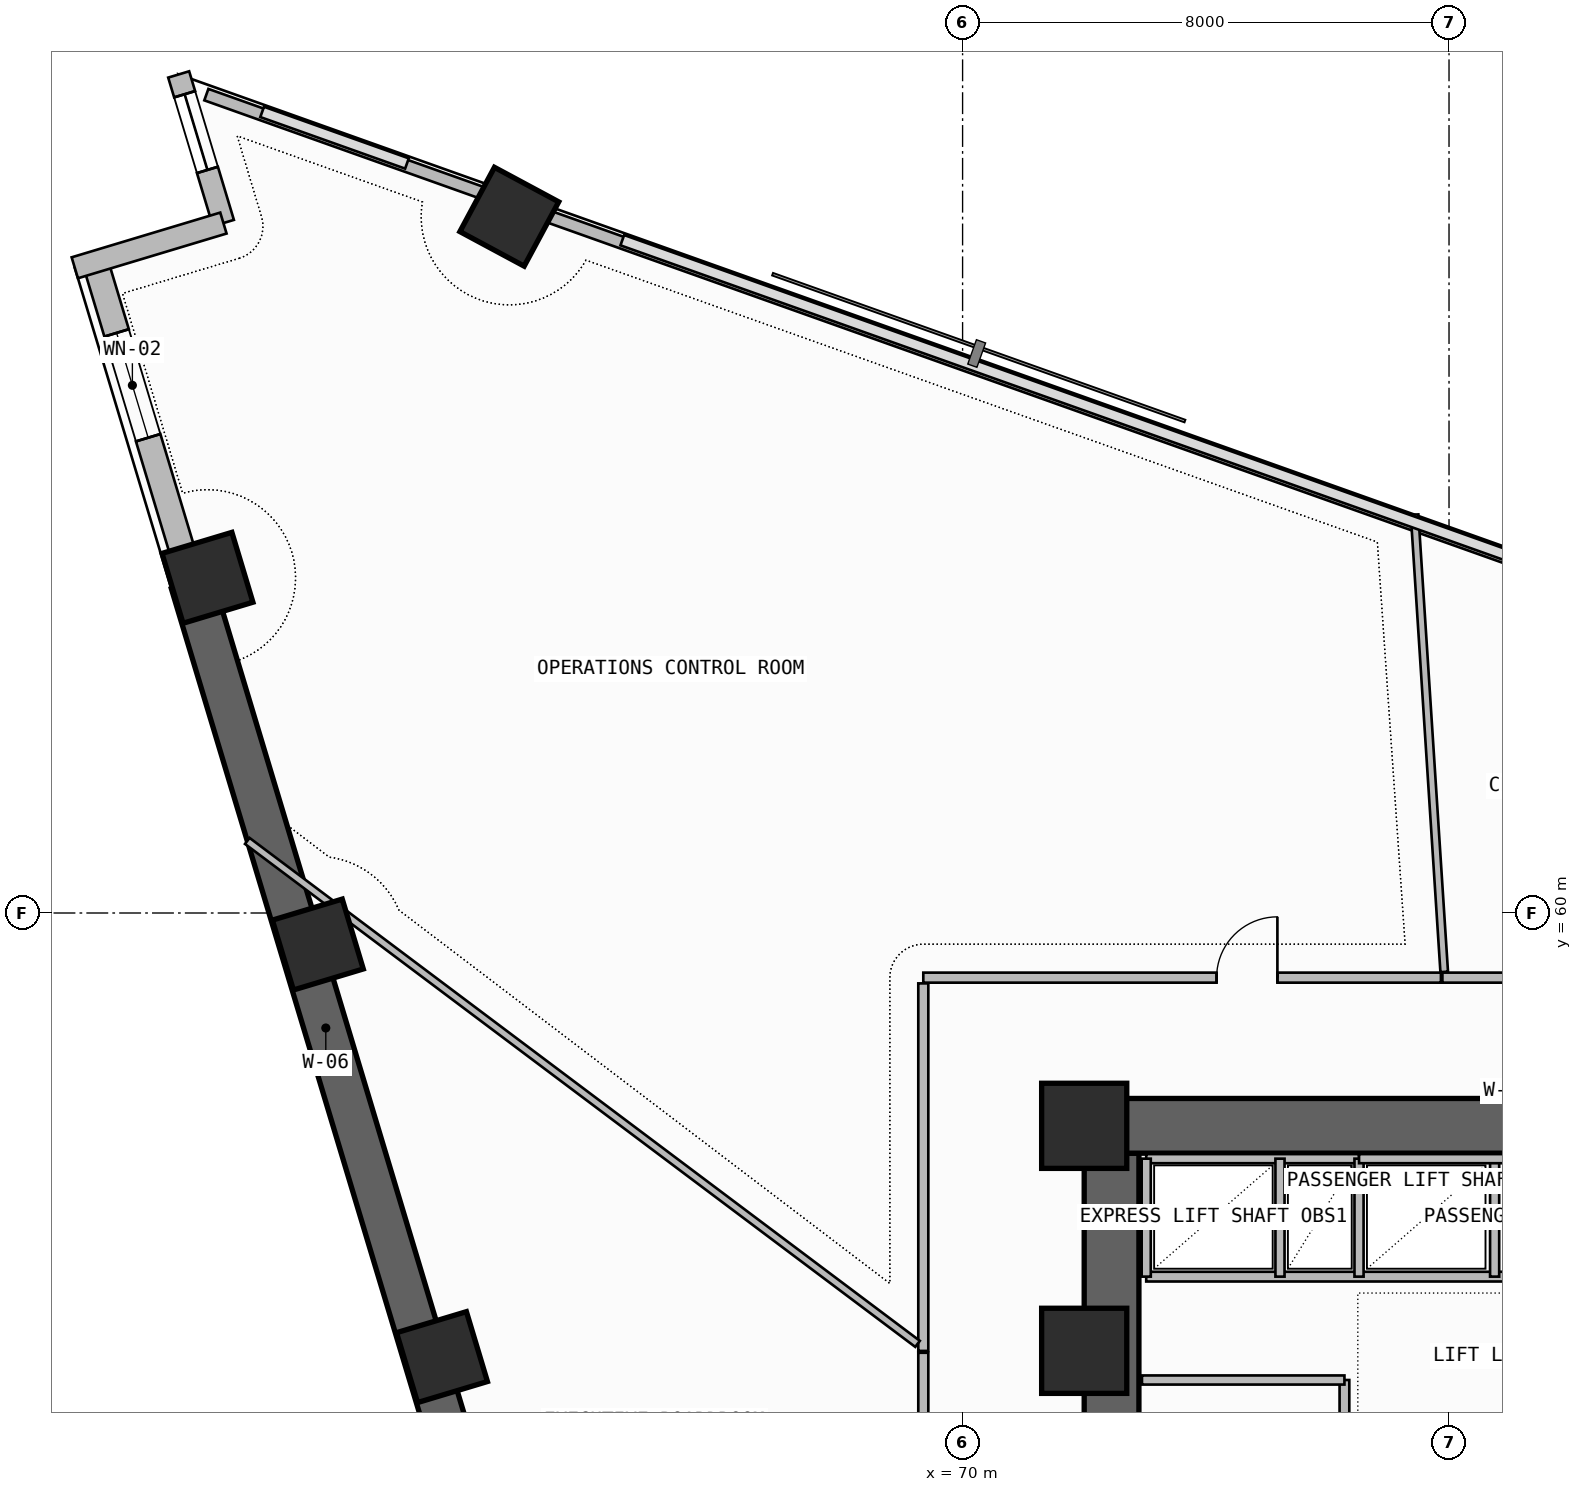
"""IFC4 building model, lengths in metres.
Left out: names, types, materials, properties, quantities, classifications, styles, units other than length and angle.
Written with IfcOpenShell. Run it as: python <this file> out.ifc"""

import sys

from ifc_helpers import new_model, si_unit, direction, frame, frame_2d, origin, origin_2d, place, context, subcontext, project, spatial, rectangle, extrude, element, fill, save


model = new_model("IFC4")
c1 = context("Model", 3, precision=1e-05, world=origin(), true_north=direction((0.0, 1.0)))
c2 = subcontext(c1, "Body", "Model", "MODEL_VIEW")
j1 = project(units=[si_unit("LENGTHUNIT", "METRE"), si_unit("PLANEANGLEUNIT", "RADIAN")], contexts=[c1])
p1 = place(None, origin())
s1 = spatial("IfcSite", under=j1, at=p1, CompositionType="ELEMENT")
p2 = place(p1, origin())
s2 = spatial("IfcBuilding", under=s1, at=p2, CompositionType="ELEMENT")
p3 = place(p2, frame((0.0, 0.0, 132.3)))
s3 = spatial("IfcBuildingStorey", under=s2, at=p3, CompositionType="ELEMENT", Elevation=132.3)
p4 = place(p3, frame((72.45, 43.35, -0.4), z_axis=(0.0, 0.0, 1.0), x_axis=(0.0, 1.0, 0.0)))
e1 = element("IfcWall", 1, at=p4, inside=s3, PredefinedType="SHEAR", context=c2, shape_type="SweptSolid", body=[
    extrude(rectangle(XDim=12.7, YDim=0.9, at=frame_2d((6.35, 0.0))), origin(), (0.0, 0.0, 1.0), 3.74),
])
p5 = place(p4, frame((1.35, 0.0, 0.4)))
e2 = element("IfcOpeningElement", 2, at=p5, cuts=e1, PredefinedType="OPENING", context=c2, shape_type="SweptSolid", body=[
    extrude(rectangle(XDim=1.2, YDim=2.2, at=frame_2d((0.6, 1.1))), frame((0.0, 0.46, 0.0), z_axis=(0.0, -1.0, 0.0), x_axis=(1.0, 0.0, 0.0)), (0.0, 0.0, 1.0), 0.92),
])
p6 = place(p3, frame((72.0, 56.5, -0.4), z_axis=(0.0, 0.0, 1.0), x_axis=(1.0, 0.0, 0.0)))
e3 = element("IfcWall", 3, at=p6, inside=s3, PredefinedType="SHEAR", context=c2, shape_type="SweptSolid", body=[
    extrude(rectangle(XDim=13.9, YDim=0.9, at=frame_2d((6.95, 0.0))), origin(), (0.0, 0.0, 1.0), 3.74),
])
for number, where, z_axis, x_axis in (
    (4, (72.0, 52.8, 0.0), (0.0, 0.0, 1.0), (1.0, 0.0, 0.0)),
    (5, (72.0, 56.5, 0.0), (0.0, 0.0, 1.0), (1.0, 0.0, 0.0)),
):
    element("IfcColumn", number, at=place(p3, frame(where, z_axis=z_axis, x_axis=x_axis)), inside=s3, PredefinedType="COLUMN", context=c2, shape_type="SweptSolid", body=[
        extrude(rectangle(XDim=1.4, YDim=1.4, at=origin_2d()), origin(), (0.0, 0.0, 1.0), 3.6),
    ])
for number, where, z_axis, x_axis in (
    (6, (62.545, 71.45, -0.4), (0.0, 0.0, 1.0), (0.473, 0.881, 0.0)),
    (7, (57.581, 65.512, -0.4), (0.0, 0.0, 1.0), (-0.288, 0.958, 0.0)),
    (8, (59.396, 59.481, -0.4), (0.0, 0.0, 1.0), (-0.288, 0.958, 0.0)),
    (9, (61.438, 52.696, -0.4), (0.0, 0.0, 1.0), (-0.288, 0.958, 0.0)),
):
    element("IfcColumn", number, at=place(p3, frame(where, z_axis=z_axis, x_axis=x_axis)), inside=s3, PredefinedType="COLUMN", context=c2, shape_type="SweptSolid", body=[
        extrude(rectangle(XDim=1.2, YDim=1.2, at=origin_2d()), origin(), (0.0, 0.0, 1.0), 4.0),
    ])
p7 = place(p3, frame((55.734, 70.711, 0.0), z_axis=(0.0, 0.0, 1.0), x_axis=(0.288221590884, -0.957563739157, 0.0)))
e10 = element("IfcWall", 10, at=p7, inside=s3, PredefinedType="SOLIDWALL", context=c2, shape_type="SweptSolid", body=[
    extrude(rectangle(XDim=5.511, YDim=0.42, at=frame_2d((2.755, 0.0))), origin(), (0.0, 0.0, 1.0), 2.725),
])
p8 = place(p7, frame((1.223, 0.0, 1.2)))
e11 = element("IfcOpeningElement", 11, at=p8, cuts=e10, PredefinedType="OPENING", context=c2, shape_type="SweptSolid", body=[
    extrude(rectangle(XDim=1.8, YDim=0.9, at=frame_2d((0.9, 0.45))), frame((0.0, 0.22, 0.0), z_axis=(0.0, -1.0, 0.0), x_axis=(1.0, 0.0, 0.0)), (0.0, 0.0, 1.0), 0.44),
])
p9 = place(p3, frame((57.323, 65.434, -0.4), z_axis=(0.0, 0.0, 1.0), x_axis=(0.288188159352, -0.957573801234, 0.0)))
e12 = element("IfcWall", 12, at=p9, inside=s3, PredefinedType="SHEAR", context=c2, shape_type="SweptSolid", body=[
    extrude(rectangle(XDim=20.469, YDim=0.7, at=frame_2d((10.234, 0.0))), origin(), (0.0, 0.0, 1.0), 3.74),
])
p10 = place(p9, frame((15.3, 0.0, 1.2)))
e13 = element("IfcOpeningElement", 13, at=p10, cuts=e12, PredefinedType="OPENING", context=c2, shape_type="SweptSolid", body=[
    extrude(rectangle(XDim=1.8, YDim=0.9, at=frame_2d((0.9, 0.45))), frame((0.0, 0.36, 0.0), z_axis=(0.0, -1.0, 0.0), x_axis=(1.0, 0.0, 0.0)), (0.0, 0.0, 1.0), 0.72),
])
p11 = place(p3, frame((57.108, 73.79, 0.0), z_axis=(0.0, 0.0, 1.0), x_axis=(0.288198985694, -0.957570542908, 0.0)))
e14 = element("IfcWall", 14, at=p11, inside=s3, PredefinedType="SOLIDWALL", context=c2, shape_type="SweptSolid", body=[
    extrude(rectangle(XDim=2.552, YDim=0.36, at=frame_2d((1.276, 0.0))), origin(), (0.0, 0.0, 1.0), 3.34),
])
p12 = place(p11, frame((0.34, 0.0, 0.45)))
e15 = element("IfcOpeningElement", 15, at=p12, cuts=e14, PredefinedType="OPENING", context=c2, shape_type="SweptSolid", body=[
    extrude(rectangle(XDim=1.3, YDim=2.4, at=frame_2d((0.65, 1.2))), frame((0.0, 0.19, 0.0), z_axis=(0.0, -1.0, 0.0), x_axis=(1.0, 0.0, 0.0)), (0.0, 0.0, 1.0), 0.38),
])
p13 = place(p3, frame((57.843, 71.346, 0.0), z_axis=(0.0, 0.0, 1.0), x_axis=(-0.95757848653, -0.288172590882, 0.0)))
e16 = element("IfcWall", 16, at=p13, inside=s3, PredefinedType="SOLIDWALL", context=c2, shape_type="SweptSolid", body=[
    extrude(rectangle(XDim=2.553, YDim=0.36, at=frame_2d((1.276, 0.0))), origin(), (0.0, 0.0, 1.0), 3.34),
])
p14 = place(p3, frame((89.368, 62.13, 0.0), z_axis=(0.0, 0.0, 1.0), x_axis=(-0.942033439765, 0.335518998515, 0.0)))
e17 = element("IfcWall", 17, at=p14, inside=s3, PredefinedType="PARAPET", context=c2, shape_type="SweptSolid", body=[
    extrude(rectangle(XDim=27.969, YDim=0.2, at=frame_2d((13.985, 0.0))), origin(), (0.0, 0.0, 1.0), 1.15),
])
p15 = place(p3, frame((62.218, 71.801, 0.0), z_axis=(0.0, 0.0, 1.0), x_axis=(-0.942038862895, 0.335503771655, 0.0)))
e18 = element("IfcWall", 18, at=p15, inside=s3, PredefinedType="PARAPET", context=c2, shape_type="SweptSolid", body=[
    extrude(rectangle(XDim=4.942, YDim=0.2, at=frame_2d((2.471, 0.0))), origin(), (0.0, 0.0, 1.0), 1.15),
])
p16 = place(p3, frame((76.28, 47.18, 0.0), z_axis=(0.0, 0.0, 1.0), x_axis=(0.0, 1.0, 0.0)))
e19 = element("IfcWall", 19, at=p16, inside=s3, PredefinedType="SOLIDWALL", context=c2, shape_type="SweptSolid", body=[
    extrude(rectangle(XDim=5.14, YDim=0.16, at=frame_2d((2.57, 0.0))), origin(), (0.0, 0.0, 1.0), 3.34),
])
p17 = place(p16, frame((1.05, 0.0, 0.0)))
e20 = element("IfcOpeningElement", 20, at=p17, cuts=e19, PredefinedType="OPENING", context=c2, shape_type="SweptSolid", body=[
    extrude(rectangle(XDim=1.0, YDim=2.2, at=frame_2d((0.5, 1.1))), frame((0.0, 0.09, 0.0), z_axis=(0.0, -1.0, 0.0), x_axis=(1.0, 0.0, 0.0)), (0.0, 0.0, 1.0), 0.18),
])
p18 = place(p16, frame((3.45, 0.0, 0.0)))
e21 = element("IfcOpeningElement", 21, at=p18, cuts=e19, PredefinedType="OPENING", context=c2, shape_type="SweptSolid", body=[
    extrude(rectangle(XDim=0.9, YDim=2.1, at=frame_2d((0.45, 1.05))), frame((0.0, 0.09, 0.0), z_axis=(0.0, -1.0, 0.0), x_axis=(1.0, 0.0, 0.0)), (0.0, 0.0, 1.0), 0.18),
])
p19 = place(p3, frame((72.95, 52.32, 0.0), z_axis=(0.0, 0.0, 1.0), x_axis=(1.0, 0.0, 0.0)))
e22 = element("IfcWall", 22, at=p19, inside=s3, PredefinedType="SOLIDWALL", context=c2, shape_type="SweptSolid", body=[
    extrude(rectangle(XDim=3.33, YDim=0.15, at=frame_2d((1.665, 0.0))), origin(), (0.0, 0.0, 1.0), 3.34),
])
p20 = place(p3, frame((73.02, 54.02, 0.0), z_axis=(0.0, 0.0, 1.0), x_axis=(1.0, 0.0, 0.0)))
e23 = element("IfcWall", 23, at=p20, inside=s3, PredefinedType="SOLIDWALL", context=c2, shape_type="SweptSolid", body=[
    extrude(rectangle(XDim=12.08, YDim=0.16, at=frame_2d((6.04, 0.0))), origin(), (0.0, 0.0, 1.0), 3.34),
])
p21 = place(p3, frame((73.02, 55.96, 0.0), z_axis=(0.0, 0.0, 1.0), x_axis=(1.0, 0.0, 0.0)))
e24 = element("IfcWall", 24, at=p21, inside=s3, PredefinedType="SOLIDWALL", context=c2, shape_type="SweptSolid", body=[
    extrude(rectangle(XDim=3.5, YDim=0.15, at=frame_2d((1.75, 0.0))), origin(), (0.0, 0.0, 1.0), 3.34),
])
p22 = place(p3, frame((73.02, 54.02, 0.0), z_axis=(0.0, 0.0, 1.0), x_axis=(0.0, 1.0, 0.0)))
e25 = element("IfcWall", 25, at=p22, inside=s3, PredefinedType="PLUMBINGWALL", context=c2, shape_type="SweptSolid", body=[
    extrude(rectangle(XDim=1.94, YDim=0.15, at=frame_2d((0.97, 0.0))), origin(), (0.0, 0.0, 1.0), 3.34),
])
p23 = place(p3, frame((76.52, 54.02, 0.0), z_axis=(0.0, 0.0, 1.0), x_axis=(0.0, 1.0, 0.0)))
e26 = element("IfcWall", 26, at=p23, inside=s3, PredefinedType="SOLIDWALL", context=c2, shape_type="SweptSolid", body=[
    extrude(rectangle(XDim=1.94, YDim=0.15, at=frame_2d((0.97, 0.0))), origin(), (0.0, 0.0, 1.0), 3.34),
])
p24 = place(p3, frame((75.22, 54.02, 0.0), z_axis=(0.0, 0.0, 1.0), x_axis=(0.0, 1.0, 0.0)))
e27 = element("IfcWall", 27, at=p24, inside=s3, PredefinedType="PLUMBINGWALL", context=c2, shape_type="SweptSolid", body=[
    extrude(rectangle(XDim=1.94, YDim=0.15, at=frame_2d((0.97, 0.0))), origin(), (0.0, 0.0, 1.0), 3.34),
])
p25 = place(p3, frame((78.75, 54.02, 0.0), z_axis=(0.0, 0.0, 1.0), x_axis=(0.0, 1.0, 0.0)))
e28 = element("IfcWall", 28, at=p25, inside=s3, PredefinedType="PLUMBINGWALL", context=c2, shape_type="SweptSolid", body=[
    extrude(rectangle(XDim=1.96, YDim=0.15, at=frame_2d((0.98, 0.0))), origin(), (0.0, 0.0, 1.0), 3.34),
])
p26 = place(p3, frame((76.52, 55.96, 0.0), z_axis=(0.0, 0.0, 1.0), x_axis=(1.0, 0.0, 0.0)))
e29 = element("IfcWall", 29, at=p26, inside=s3, PredefinedType="SOLIDWALL", context=c2, shape_type="SweptSolid", body=[
    extrude(rectangle(XDim=6.7, YDim=0.15, at=frame_2d((3.35, 0.0))), origin(), (0.0, 0.0, 1.0), 3.34),
])
p27 = place(p3, frame((92.05, 58.937, 0.0), z_axis=(0.0, 0.0, 1.0), x_axis=(-1.0, 0.0, 0.0)))
e30 = element("IfcWall", 30, at=p27, inside=s3, PredefinedType="PARTITIONING", context=c2, shape_type="SweptSolid", body=[
    extrude(rectangle(XDim=14.159, YDim=0.165, at=frame_2d((7.08, 0.0))), origin(), (0.0, 0.0, 1.0), 2.725),
])
p28 = place(p27, frame((3.007, 0.0, 0.0)))
e31 = element("IfcOpeningElement", 31, at=p28, cuts=e30, PredefinedType="OPENING", context=c2, shape_type="SweptSolid", body=[
    extrude(rectangle(XDim=1.0, YDim=2.2, at=frame_2d((0.5, 1.1))), frame((0.0, 0.093, 0.0), z_axis=(0.0, -1.0, 0.0), x_axis=(1.0, 0.0, 0.0)), (0.0, 0.0, 1.0), 0.185),
])
p29 = place(p3, frame((77.921, 59.031, 0.0), z_axis=(0.0, 0.0, 1.0), x_axis=(-0.064701804288, 0.997904643, 0.0)))
e32 = element("IfcWall", 32, at=p29, inside=s3, PredefinedType="PARTITIONING", context=c2, shape_type="SweptSolid", body=[
    extrude(rectangle(XDim=7.535, YDim=0.125, at=frame_2d((3.768, 0.0))), origin(), (0.0, 0.0, 1.0), 3.34),
])
p30 = place(p3, frame((77.867, 58.937, 0.0), z_axis=(0.0, 0.0, 1.0), x_axis=(-1.0, 0.0, 0.0)))
e33 = element("IfcWall", 33, at=p30, inside=s3, PredefinedType="PARTITIONING", context=c2, shape_type="SweptSolid", body=[
    extrude(rectangle(XDim=8.513, YDim=0.165, at=frame_2d((4.257, 0.0))), origin(), (0.0, 0.0, 1.0), 2.725),
])
p31 = place(p30, frame((2.69, 0.0, 0.0)))
e34 = element("IfcOpeningElement", 34, at=p31, cuts=e33, PredefinedType="OPENING", context=c2, shape_type="SweptSolid", body=[
    extrude(rectangle(XDim=1.0, YDim=2.2, at=frame_2d((0.5, 1.1))), frame((0.0, 0.093, 0.0), z_axis=(0.0, -1.0, 0.0), x_axis=(1.0, 0.0, 0.0)), (0.0, 0.0, 1.0), 0.185),
])
p32 = place(p3, frame((69.354, 58.843, 0.0), z_axis=(0.0, 0.0, 1.0), x_axis=(0.0, -1.0, 0.0)))
e35 = element("IfcWall", 35, at=p32, inside=s3, PredefinedType="PARTITIONING", context=c2, shape_type="SweptSolid", body=[
    extrude(rectangle(XDim=6.044, YDim=0.165, at=frame_2d((3.022, 0.0))), origin(), (0.0, 0.0, 1.0), 2.725),
])
p33 = place(p3, frame((69.259, 52.914, 0.0), z_axis=(0.0, 0.0, 1.0), x_axis=(-0.799887318225, 0.600150212983, 0.0)))
e36 = element("IfcWall", 36, at=p33, inside=s3, PredefinedType="PARTITIONING", context=c2, shape_type="SweptSolid", body=[
    extrude(rectangle(XDim=13.781, YDim=0.125, at=frame_2d((6.891, 0.0))), origin(), (0.0, 0.0, 1.0), 2.725),
])
p34 = place(p3, frame((69.354, 52.768, 0.0), z_axis=(0.0, 0.0, 1.0), x_axis=(0.0, -1.0, 0.0)))
e37 = element("IfcWall", 37, at=p34, inside=s3, PredefinedType="PARTITIONING", context=c2, shape_type="SweptSolid", body=[
    extrude(rectangle(XDim=9.086, YDim=0.165, at=frame_2d((4.543, 0.0))), origin(), (0.0, 0.0, 1.0), 2.725),
])
p35 = place(p34, frame((4.043, 0.0, 0.0)))
e38 = element("IfcOpeningElement", 38, at=p35, cuts=e37, PredefinedType="OPENING", context=c2, shape_type="SweptSolid", body=[
    extrude(rectangle(XDim=1.0, YDim=2.2, at=frame_2d((0.5, 1.1))), frame((0.0, 0.093, 0.0), z_axis=(0.0, -1.0, 0.0), x_axis=(1.0, 0.0, 0.0)), (0.0, 0.0, 1.0), 0.185),
])
p36 = place(p8, origin())
e39 = element("IfcWindow", 39, at=p36, inside=s3, PartitioningType="SINGLE_PANEL", PredefinedType="WINDOW", context=c2, shape_type="SweptSolid", body=[
    extrude(rectangle(XDim=1.8, YDim=0.9, at=frame_2d((0.9, 0.45))), frame((0.0, 0.03, 0.0), z_axis=(0.0, -1.0, 0.0), x_axis=(1.0, 0.0, 0.0)), (0.0, 0.0, 1.0), 0.06),
])
fill(e11, e39)
p37 = place(p12, origin())
e40 = element("IfcWindow", 40, at=p37, inside=s3, PartitioningType="SINGLE_PANEL", PredefinedType="WINDOW", context=c2, shape_type="SweptSolid", body=[
    extrude(rectangle(XDim=1.3, YDim=2.4, at=frame_2d((0.65, 1.2))), frame((0.0, 0.03, 0.0), z_axis=(0.0, -1.0, 0.0), x_axis=(1.0, 0.0, 0.0)), (0.0, 0.0, 1.0), 0.06),
])
fill(e15, e40)
p38 = place(p31, frame((1.0, 0.0, 0.0), z_axis=(0.0, 0.0, 1.0), x_axis=(-1.0, 0.0, 0.0)))
e41 = element("IfcDoor", 41, at=p38, inside=s3, OperationType="SINGLE_SWING_RIGHT", PredefinedType="DOOR", context=c2, shape_type="SweptSolid", body=[
    extrude(rectangle(XDim=1.0, YDim=2.2, at=frame_2d((0.5, 1.1))), frame((0.0, 0.025, 0.0), z_axis=(0.0, -1.0, 0.0), x_axis=(1.0, 0.0, 0.0)), (0.0, 0.0, 1.0), 0.05),
])
fill(e34, e41)
save(model, sys.argv[1])
